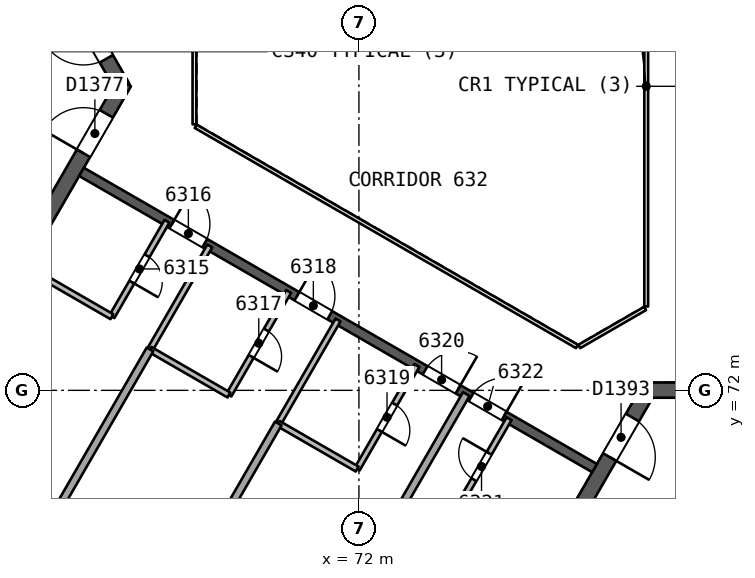
"""IFC4 building model, lengths in metres.
Left out: names, types, materials, properties, quantities, classifications, styles, units other than length and angle.
Written with IfcOpenShell. Run it as: python <this file> out.ifc"""

import sys

from ifc_helpers import new_model, si_unit, direction, frame, frame_2d, origin, place, context, subcontext, project, spatial, rectangle, extrude, element, fill, save


model = new_model("IFC4")
c1 = context("Model", 3, precision=1e-05, world=origin(), true_north=direction((0.0, 1.0)))
c2 = subcontext(c1, "Body", "Model", "MODEL_VIEW")
j1 = project(units=[si_unit("LENGTHUNIT", "METRE"), si_unit("PLANEANGLEUNIT", "RADIAN")], contexts=[c1])
p1 = place(None, origin())
s1 = spatial("IfcSite", under=j1, at=p1, CompositionType="ELEMENT")
p2 = place(p1, origin())
s2 = spatial("IfcBuilding", under=s1, at=p2, CompositionType="ELEMENT")
p3 = place(p2, frame((0.0, 0.0, 259.0)))
s3 = spatial("IfcBuildingStorey", under=s2, at=p3, CompositionType="ELEMENT", Elevation=259.0)
p4 = place(p3, frame((65.769, 80.0, 0.0), z_axis=(0.0, 0.0, 1.0), x_axis=(-0.50000177223, 0.866024380585, 0.0)))
e1 = element("IfcWall", 1, at=p4, inside=s3, PredefinedType="SHEAR", context=c2, shape_type="SweptSolid", body=[
    extrude(rectangle(XDim=10.265, YDim=0.4, at=frame_2d((5.132, 0.0))), origin(), (0.0, 0.0, 1.0), 3.7),
])
p5 = place(p4, frame((0.834, 0.0, 0.0)))
e2 = element("IfcOpeningElement", 2, at=p5, cuts=e1, PredefinedType="OPENING", context=c2, shape_type="SweptSolid", body=[
    extrude(rectangle(XDim=1.2, YDim=2.1, at=frame_2d((0.6, 1.05))), frame((0.0, 0.21, 0.0), z_axis=(0.0, -1.0, 0.0), x_axis=(1.0, 0.0, 0.0)), (0.0, 0.0, 1.0), 0.421),
])
p6 = place(p3, frame((60.737, 71.284, 0.0), z_axis=(0.0, 0.0, 1.0), x_axis=(0.50000547566, 0.866022242388, 0.0)))
e3 = element("IfcWall", 3, at=p6, inside=s3, PredefinedType="SHEAR", context=c2, shape_type="SweptSolid", body=[
    extrude(rectangle(XDim=10.18, YDim=0.4, at=frame_2d((5.09, 0.0))), origin(), (0.0, 0.0, 1.0), 3.7),
])
p7 = place(p6, frame((8.03, 0.0, 0.0)))
e4 = element("IfcOpeningElement", 4, at=p7, cuts=e3, PredefinedType="OPENING", context=c2, shape_type="SweptSolid", body=[
    extrude(rectangle(XDim=1.2, YDim=2.1, at=frame_2d((0.6, 1.05))), frame((0.0, 0.21, 0.0), z_axis=(0.0, -1.0, 0.0), x_axis=(1.0, 0.0, 0.0)), (0.0, 0.0, 1.0), 0.421),
])
p8 = place(p3, frame((79.615, 72.006, 0.0), z_axis=(0.0, 0.0, 1.0), x_axis=(-0.50000177223, -0.866024380585, 0.0)))
e5 = element("IfcWall", 5, at=p8, inside=s3, PredefinedType="SHEAR", context=c2, shape_type="SweptSolid", body=[
    extrude(rectangle(XDim=10.265, YDim=0.4, at=frame_2d((5.132, 0.0))), origin(), (0.0, 0.0, 1.0), 3.7),
])
p9 = place(p8, frame((0.834, 0.0, 0.0)))
e6 = element("IfcOpeningElement", 6, at=p9, cuts=e5, PredefinedType="OPENING", context=c2, shape_type="SweptSolid", body=[
    extrude(rectangle(XDim=1.2, YDim=2.1, at=frame_2d((0.6, 1.05))), frame((0.0, 0.21, 0.0), z_axis=(0.0, -1.0, 0.0), x_axis=(1.0, 0.0, 0.0)), (0.0, 0.0, 1.0), 0.421),
])
p10 = place(p3, frame((89.68, 72.006, 0.0), z_axis=(0.0, 0.0, 1.0), x_axis=(-1.0, 0.0, 0.0)))
e7 = element("IfcWall", 7, at=p10, inside=s3, PredefinedType="SHEAR", context=c2, shape_type="SweptSolid", body=[
    extrude(rectangle(XDim=10.18, YDim=0.4, at=frame_2d((5.09, 0.0))), origin(), (0.0, 0.0, 1.0), 3.7),
])
p11 = place(p10, frame((8.03, 0.0, 0.0)))
e8 = element("IfcOpeningElement", 8, at=p11, cuts=e7, PredefinedType="OPENING", context=c2, shape_type="SweptSolid", body=[
    extrude(rectangle(XDim=1.2, YDim=2.1, at=frame_2d((0.6, 1.05))), frame((0.0, 0.21, 0.0), z_axis=(0.0, -1.0, 0.0), x_axis=(1.0, 0.0, 0.0)), (0.0, 0.0, 1.0), 0.421),
])
p12 = place(p3, frame((64.7, 77.748, 0.0), z_axis=(0.0, 0.0, 1.0), x_axis=(0.866026492143, -0.499998114903, 0.0)))
e9 = element("IfcWall", 9, at=p12, inside=s3, PredefinedType="SHEAR", context=c2, shape_type="SweptSolid", body=[
    extrude(rectangle(XDim=15.588, YDim=0.25, at=frame_2d((7.794, 0.0))), origin(), (0.0, 0.0, 1.0), 3.3),
])
p13 = place(p12, frame((2.747, 0.0, 0.0)))
e10 = element("IfcOpeningElement", 10, at=p13, cuts=e9, PredefinedType="OPENING", context=c2, shape_type="SweptSolid", body=[
    extrude(rectangle(XDim=1.0, YDim=2.1, at=frame_2d((0.5, 1.05))), frame((0.0, 0.135, 0.0), z_axis=(0.0, -1.0, 0.0), x_axis=(1.0, 0.0, 0.0)), (0.0, 0.0, 1.0), 0.271),
])
p14 = place(p12, frame((6.544, 0.0, 0.0)))
e11 = element("IfcOpeningElement", 11, at=p14, cuts=e9, PredefinedType="OPENING", context=c2, shape_type="SweptSolid", body=[
    extrude(rectangle(XDim=1.0, YDim=2.1, at=frame_2d((0.5, 1.05))), frame((0.0, 0.135, 0.0), z_axis=(0.0, -1.0, 0.0), x_axis=(1.0, 0.0, 0.0)), (0.0, 0.0, 1.0), 0.271),
])
p15 = place(p12, frame((10.441, 0.0, 0.0)))
e12 = element("IfcOpeningElement", 12, at=p15, cuts=e9, PredefinedType="OPENING", context=c2, shape_type="SweptSolid", body=[
    extrude(rectangle(XDim=1.0, YDim=2.1, at=frame_2d((0.5, 1.05))), frame((0.0, 0.135, 0.0), z_axis=(0.0, -1.0, 0.0), x_axis=(1.0, 0.0, 0.0)), (0.0, 0.0, 1.0), 0.271),
])
p16 = place(p12, frame((11.841, 0.0, 0.0)))
e13 = element("IfcOpeningElement", 13, at=p16, cuts=e9, PredefinedType="OPENING", context=c2, shape_type="SweptSolid", body=[
    extrude(rectangle(XDim=1.0, YDim=2.1, at=frame_2d((0.5, 1.05))), frame((0.0, 0.135, 0.0), z_axis=(0.0, -1.0, 0.0), x_axis=(1.0, 0.0, 0.0)), (0.0, 0.0, 1.0), 0.271),
])
p17 = place(p3, frame((66.949, 76.45, 0.0), z_axis=(0.0, 0.0, 1.0), x_axis=(-0.499987231761, -0.866032775405, 0.0)))
e14 = element("IfcWall", 14, at=p17, inside=s3, PredefinedType="PARTITIONING", context=c2, shape_type="SweptSolid", body=[
    extrude(rectangle(XDim=2.9, YDim=0.15, at=frame_2d((1.45, 0.0))), origin(), (0.0, 0.0, 1.0), 3.3),
])
p18 = place(p17, frame((1.05, 0.0, 0.0)))
e15 = element("IfcOpeningElement", 15, at=p18, cuts=e14, PredefinedType="OPENING", context=c2, shape_type="SweptSolid", body=[
    extrude(rectangle(XDim=0.8, YDim=2.1, at=frame_2d((0.4, 1.05))), frame((0.0, 0.085, 0.0), z_axis=(0.0, -1.0, 0.0), x_axis=(1.0, 0.0, 0.0)), (0.0, 0.0, 1.0), 0.171),
])
p19 = place(p3, frame((65.499, 73.938, 0.0), z_axis=(0.0, 0.0, 1.0), x_axis=(-0.866004188936, 0.500036743394, 0.0)))
e16 = element("IfcWall", 16, at=p19, inside=s3, PredefinedType="PARTITIONING", context=c2, shape_type="SweptSolid", body=[
    extrude(rectangle(XDim=2.398, YDim=0.15, at=frame_2d((1.199, 0.0))), origin(), (0.0, 0.0, 1.0), 3.3),
])
p20 = place(p3, frame((63.261, 67.462, 0.0), z_axis=(0.0, 0.0, 1.0), x_axis=(0.499983274767, 0.866035059887, 0.0)))
e17 = element("IfcWall", 17, at=p20, inside=s3, PredefinedType="PARTITIONING", context=c2, shape_type="SweptSolid", body=[
    extrude(rectangle(XDim=6.482, YDim=0.2, at=frame_2d((3.241, 0.0))), origin(), (0.0, 0.0, 1.0), 3.3),
])
p21 = place(p3, frame((66.502, 73.076, 0.0), z_axis=(0.0, 0.0, 1.0), x_axis=(0.499995674689, 0.86602790099, 0.0)))
e18 = element("IfcWall", 18, at=p21, inside=s3, PredefinedType="PARTITIONING", context=c2, shape_type="SweptSolid", body=[
    extrude(rectangle(XDim=3.146, YDim=0.15, at=frame_2d((1.573, 0.0))), origin(), (0.0, 0.0, 1.0), 3.3),
])
p22 = place(p3, frame((70.151, 74.601, 0.0), z_axis=(0.0, 0.0, 1.0), x_axis=(-0.499995674689, -0.86602790099, 0.0)))
e19 = element("IfcWall", 19, at=p22, inside=s3, PredefinedType="PARTITIONING", context=c2, shape_type="SweptSolid", body=[
    extrude(rectangle(XDim=3.146, YDim=0.15, at=frame_2d((1.573, 0.0))), origin(), (0.0, 0.0, 1.0), 3.3),
])
p23 = place(p22, frame((1.173, 0.0, 0.0)))
e20 = element("IfcOpeningElement", 20, at=p23, cuts=e19, PredefinedType="OPENING", context=c2, shape_type="SweptSolid", body=[
    extrude(rectangle(XDim=0.8, YDim=2.1, at=frame_2d((0.4, 1.05))), frame((0.0, 0.085, 0.0), z_axis=(0.0, -1.0, 0.0), x_axis=(1.0, 0.0, 0.0)), (0.0, 0.0, 1.0), 0.171),
])
p24 = place(p3, frame((68.578, 71.877, 0.0), z_axis=(0.0, 0.0, 1.0), x_axis=(-0.866034636017, 0.499984008963, 0.0)))
e21 = element("IfcWall", 21, at=p24, inside=s3, PredefinedType="PARTITIONING", context=c2, shape_type="SweptSolid", body=[
    extrude(rectangle(XDim=2.397, YDim=0.15, at=frame_2d((1.198, 0.0))), origin(), (0.0, 0.0, 1.0), 3.3),
])
p25 = place(p3, frame((66.636, 65.513, 0.0), z_axis=(0.0, 0.0, 1.0), x_axis=(0.499983274767, 0.866035059887, 0.0)))
e22 = element("IfcWall", 22, at=p25, inside=s3, PredefinedType="PARTITIONING", context=c2, shape_type="SweptSolid", body=[
    extrude(rectangle(XDim=6.482, YDim=0.2, at=frame_2d((3.241, 0.0))), origin(), (0.0, 0.0, 1.0), 3.3),
])
p26 = place(p3, frame((69.877, 71.127, 0.0), z_axis=(0.0, 0.0, 1.0), x_axis=(0.499995674689, 0.86602790099, 0.0)))
e23 = element("IfcWall", 23, at=p26, inside=s3, PredefinedType="PARTITIONING", context=c2, shape_type="SweptSolid", body=[
    extrude(rectangle(XDim=3.146, YDim=0.15, at=frame_2d((1.573, 0.0))), origin(), (0.0, 0.0, 1.0), 3.3),
])
p27 = place(p3, frame((73.526, 72.653, 0.0), z_axis=(0.0, 0.0, 1.0), x_axis=(-0.500029284648, -0.866008495625, 0.0)))
e24 = element("IfcWall", 24, at=p27, inside=s3, PredefinedType="PARTITIONING", context=c2, shape_type="SweptSolid", body=[
    extrude(rectangle(XDim=3.145, YDim=0.15, at=frame_2d((1.573, 0.0))), origin(), (0.0, 0.0, 1.0), 3.3),
])
p28 = place(p27, frame((1.173, 0.0, 0.0)))
e25 = element("IfcOpeningElement", 25, at=p28, cuts=e24, PredefinedType="OPENING", context=c2, shape_type="SweptSolid", body=[
    extrude(rectangle(XDim=0.8, YDim=2.1, at=frame_2d((0.4, 1.05))), frame((0.0, 0.085, 0.0), z_axis=(0.0, -1.0, 0.0), x_axis=(1.0, 0.0, 0.0)), (0.0, 0.0, 1.0), 0.171),
])
p29 = place(p3, frame((71.953, 69.929, 0.0), z_axis=(0.0, 0.0, 1.0), x_axis=(-0.866034636017, 0.499984008963, 0.0)))
e26 = element("IfcWall", 26, at=p29, inside=s3, PredefinedType="PARTITIONING", context=c2, shape_type="SweptSolid", body=[
    extrude(rectangle(XDim=2.397, YDim=0.15, at=frame_2d((1.198, 0.0))), origin(), (0.0, 0.0, 1.0), 3.3),
])
p30 = place(p3, frame((70.011, 63.565, 0.0), z_axis=(0.0, 0.0, 1.0), x_axis=(0.499987326052, 0.866032720968, 0.0)))
e27 = element("IfcWall", 27, at=p30, inside=s3, PredefinedType="PARTITIONING", context=c2, shape_type="SweptSolid", body=[
    extrude(rectangle(XDim=9.628, YDim=0.2, at=frame_2d((4.814, 0.0))), origin(), (0.0, 0.0, 1.0), 3.3),
])
p31 = place(p3, frame((74.501, 68.741, 0.0), z_axis=(0.0, 0.0, 1.0), x_axis=(0.50005036918, 0.865996321171, 0.0)))
e28 = element("IfcWall", 28, at=p31, inside=s3, PredefinedType="PARTITIONING", context=c2, shape_type="SweptSolid", body=[
    extrude(rectangle(XDim=2.9, YDim=0.15, at=frame_2d((1.45, 0.0))), origin(), (0.0, 0.0, 1.0), 3.3),
])
p32 = place(p31, frame((1.05, 0.0, 0.0)))
e29 = element("IfcOpeningElement", 29, at=p32, cuts=e28, PredefinedType="OPENING", context=c2, shape_type="SweptSolid", body=[
    extrude(rectangle(XDim=0.8, YDim=2.1, at=frame_2d((0.4, 1.05))), frame((0.0, 0.085, 0.0), z_axis=(0.0, -1.0, 0.0), x_axis=(1.0, 0.0, 0.0)), (0.0, 0.0, 1.0), 0.171),
])
p33 = place(p3, frame((87.577, 53.251, 0.0), z_axis=(0.0, 0.0, 1.0), x_axis=(-0.86602550179, 0.499999830249, 0.0)))
e30 = element("IfcWall", 30, at=p33, inside=s3, PredefinedType="SOLIDWALL", context=c2, shape_type="SweptSolid", body=[
    extrude(rectangle(XDim=48.533, YDim=0.3, at=frame_2d((24.267, 0.0))), origin(), (0.0, 0.0, 1.0), 3.3),
])
p34 = place(p33, frame((37.192, 0.0, 0.0)))
e31 = element("IfcOpeningElement", 31, at=p34, cuts=e30, PredefinedType="OPENING", context=c2, shape_type="SweptSolid", body=[
    extrude(rectangle(XDim=2.4, YDim=2.4, at=frame_2d((1.2, 1.2))), frame((0.0, 0.161, 0.0), z_axis=(0.0, -1.0, 0.0), x_axis=(1.0, 0.0, 0.0)), (0.0, 0.0, 1.0), 0.321),
])
p35 = place(p33, frame((8.941, 0.0, 0.0)))
e32 = element("IfcOpeningElement", 32, at=p35, cuts=e30, PredefinedType="OPENING", context=c2, shape_type="SweptSolid", body=[
    extrude(rectangle(XDim=2.4, YDim=2.4, at=frame_2d((1.2, 1.2))), frame((0.0, 0.161, 0.0), z_axis=(0.0, -1.0, 0.0), x_axis=(1.0, 0.0, 0.0)), (0.0, 0.0, 1.0), 0.321),
])
p36 = place(p33, frame((25.015, 0.0, 0.0)))
e33 = element("IfcOpeningElement", 33, at=p36, cuts=e30, PredefinedType="OPENING", context=c2, shape_type="SweptSolid", body=[
    extrude(rectangle(XDim=2.4, YDim=2.4, at=frame_2d((1.2, 1.2))), frame((0.0, 0.161, 0.0), z_axis=(0.0, -1.0, 0.0), x_axis=(1.0, 0.0, 0.0)), (0.0, 0.0, 1.0), 0.321),
])
p37 = place(p33, frame((21.118, 0.0, 0.0)))
e34 = element("IfcOpeningElement", 34, at=p37, cuts=e30, PredefinedType="OPENING", context=c2, shape_type="SweptSolid", body=[
    extrude(rectangle(XDim=2.4, YDim=2.4, at=frame_2d((1.2, 1.2))), frame((0.0, 0.161, 0.0), z_axis=(0.0, -1.0, 0.0), x_axis=(1.0, 0.0, 0.0)), (0.0, 0.0, 1.0), 0.321),
])
p38 = place(p3, frame((77.135, 64.952, 0.0), z_axis=(0.0, 0.0, 1.0), x_axis=(0.866031916153, 0.499988720078, 0.0)))
e35 = element("IfcWall", 35, at=p38, inside=s3, PredefinedType="SOLIDWALL", context=c2, shape_type="SweptSolid", body=[
    extrude(rectangle(XDim=11.35, YDim=0.2, at=frame_2d((5.675, 0.0))), origin(), (0.0, 0.0, 1.0), 3.3),
])
p39 = place(p38, frame((2.875, 0.0, 0.0)))
e36 = element("IfcOpeningElement", 36, at=p39, cuts=e35, PredefinedType="OPENING", context=c2, shape_type="SweptSolid", body=[
    extrude(rectangle(XDim=1.1, YDim=2.1, at=frame_2d((0.55, 1.05))), frame((0.0, 0.11, 0.0), z_axis=(0.0, -1.0, 0.0), x_axis=(1.0, 0.0, 0.0)), (0.0, 0.0, 1.0), 0.221),
])
p40 = place(p38, frame((5.125, 0.0, 0.0)))
e37 = element("IfcOpeningElement", 37, at=p40, cuts=e35, PredefinedType="OPENING", context=c2, shape_type="SweptSolid", body=[
    extrude(rectangle(XDim=1.1, YDim=2.1, at=frame_2d((0.55, 1.05))), frame((0.0, 0.11, 0.0), z_axis=(0.0, -1.0, 0.0), x_axis=(1.0, 0.0, 0.0)), (0.0, 0.0, 1.0), 0.221),
])
p41 = place(p38, frame((7.375, 0.0, 0.0)))
e38 = element("IfcOpeningElement", 38, at=p41, cuts=e35, PredefinedType="OPENING", context=c2, shape_type="SweptSolid", body=[
    extrude(rectangle(XDim=1.1, YDim=2.1, at=frame_2d((0.55, 1.05))), frame((0.0, 0.11, 0.0), z_axis=(0.0, -1.0, 0.0), x_axis=(1.0, 0.0, 0.0)), (0.0, 0.0, 1.0), 0.221),
])
p42 = place(p3, frame((79.56, 74.206, 0.0), z_axis=(0.0, 0.0, 1.0), x_axis=(0.0, 1.0, 0.0)))
e39 = element("IfcWall", 39, at=p42, inside=s3, PredefinedType="PARTITIONING", context=c2, shape_type="SweptSolid", body=[
    extrude(rectangle(XDim=11.588, YDim=0.1, at=frame_2d((5.794, 0.0))), origin(), (0.0, 0.0, 1.0), 3.3),
])
p43 = place(p3, frame((67.672, 81.0, 0.0), z_axis=(0.0, 0.0, 1.0), x_axis=(0.0, -1.0, 0.0)))
e40 = element("IfcWall", 40, at=p43, inside=s3, PredefinedType="PARTITIONING", context=c2, shape_type="SweptSolid", body=[
    extrude(rectangle(XDim=2.0, YDim=0.1, at=frame_2d((1.0, 0.0))), origin(), (0.0, 0.0, 1.0), 3.3),
])
p44 = place(p3, frame((67.702, 78.948, 0.0), z_axis=(0.0, 0.0, 1.0), x_axis=(0.866026658274, -0.499997827154, 0.0)))
e41 = element("IfcWall", 41, at=p44, inside=s3, PredefinedType="PARTITIONING", context=c2, shape_type="SweptSolid", body=[
    extrude(rectangle(XDim=11.588, YDim=0.1, at=frame_2d((5.794, 0.0))), origin(), (0.0, 0.0, 1.0), 3.3),
])
p45 = place(p3, frame((77.798, 73.154, 0.0), z_axis=(0.0, 0.0, 1.0), x_axis=(0.866041268327, 0.499972520799, 0.0)))
e42 = element("IfcWall", 42, at=p45, inside=s3, PredefinedType="PARTITIONING", context=c2, shape_type="SweptSolid", body=[
    extrude(rectangle(XDim=2.0, YDim=0.1, at=frame_2d((1.0, 0.0))), origin(), (0.0, 0.0, 1.0), 3.3),
])
p46 = place(p18, origin())
e43 = element("IfcDoor", 43, at=p46, inside=s3, OperationType="SINGLE_SWING_RIGHT", PredefinedType="NOTDEFINED", context=c2, shape_type="SweptSolid", body=[
    extrude(rectangle(XDim=0.8, YDim=2.1, at=frame_2d((0.4, 1.05))), frame((0.0, 0.025, 0.0), z_axis=(0.0, -1.0, 0.0), x_axis=(1.0, 0.0, 0.0)), (0.0, 0.0, 1.0), 0.05),
])
fill(e15, e43)
p47 = place(p13, origin())
e44 = element("IfcDoor", 44, at=p47, inside=s3, OperationType="SINGLE_SWING_LEFT", PredefinedType="NOTDEFINED", context=c2, shape_type="SweptSolid", body=[
    extrude(rectangle(XDim=1.0, YDim=2.1, at=frame_2d((0.5, 1.05))), frame((0.0, 0.025, 0.0), z_axis=(0.0, -1.0, 0.0), x_axis=(1.0, 0.0, 0.0)), (0.0, 0.0, 1.0), 0.05),
])
fill(e10, e44)
p48 = place(p23, origin())
e45 = element("IfcDoor", 45, at=p48, inside=s3, OperationType="SINGLE_SWING_RIGHT", PredefinedType="NOTDEFINED", context=c2, shape_type="SweptSolid", body=[
    extrude(rectangle(XDim=0.8, YDim=2.1, at=frame_2d((0.4, 1.05))), frame((0.0, 0.025, 0.0), z_axis=(0.0, -1.0, 0.0), x_axis=(1.0, 0.0, 0.0)), (0.0, 0.0, 1.0), 0.05),
])
fill(e20, e45)
p49 = place(p14, origin())
e46 = element("IfcDoor", 46, at=p49, inside=s3, OperationType="SINGLE_SWING_LEFT", PredefinedType="NOTDEFINED", context=c2, shape_type="SweptSolid", body=[
    extrude(rectangle(XDim=1.0, YDim=2.1, at=frame_2d((0.5, 1.05))), frame((0.0, 0.025, 0.0), z_axis=(0.0, -1.0, 0.0), x_axis=(1.0, 0.0, 0.0)), (0.0, 0.0, 1.0), 0.05),
])
fill(e11, e46)
p50 = place(p28, origin())
e47 = element("IfcDoor", 47, at=p50, inside=s3, OperationType="SINGLE_SWING_RIGHT", PredefinedType="NOTDEFINED", context=c2, shape_type="SweptSolid", body=[
    extrude(rectangle(XDim=0.8, YDim=2.1, at=frame_2d((0.4, 1.05))), frame((0.0, 0.025, 0.0), z_axis=(0.0, -1.0, 0.0), x_axis=(1.0, 0.0, 0.0)), (0.0, 0.0, 1.0), 0.05),
])
fill(e25, e47)
p51 = place(p15, origin())
e48 = element("IfcDoor", 48, at=p51, inside=s3, OperationType="SINGLE_SWING_RIGHT", PredefinedType="NOTDEFINED", context=c2, shape_type="SweptSolid", body=[
    extrude(rectangle(XDim=1.0, YDim=2.1, at=frame_2d((0.5, 1.05))), frame((0.0, 0.025, 0.0), z_axis=(0.0, -1.0, 0.0), x_axis=(1.0, 0.0, 0.0)), (0.0, 0.0, 1.0), 0.05),
])
fill(e12, e48)
p52 = place(p32, origin())
e49 = element("IfcDoor", 49, at=p52, inside=s3, OperationType="SINGLE_SWING_RIGHT", PredefinedType="NOTDEFINED", context=c2, shape_type="SweptSolid", body=[
    extrude(rectangle(XDim=0.8, YDim=2.1, at=frame_2d((0.4, 1.05))), frame((0.0, 0.025, 0.0), z_axis=(0.0, -1.0, 0.0), x_axis=(1.0, 0.0, 0.0)), (0.0, 0.0, 1.0), 0.05),
])
fill(e29, e49)
p53 = place(p16, origin())
e50 = element("IfcDoor", 50, at=p53, inside=s3, OperationType="SINGLE_SWING_RIGHT", PredefinedType="NOTDEFINED", context=c2, shape_type="SweptSolid", body=[
    extrude(rectangle(XDim=1.0, YDim=2.1, at=frame_2d((0.5, 1.05))), frame((0.0, 0.025, 0.0), z_axis=(0.0, -1.0, 0.0), x_axis=(1.0, 0.0, 0.0)), (0.0, 0.0, 1.0), 0.05),
])
fill(e13, e50)
p54 = place(p5, origin())
e51 = element("IfcDoor", 51, at=p54, inside=s3, OperationType="SINGLE_SWING_RIGHT", PredefinedType="NOTDEFINED", context=c2, shape_type="SweptSolid", body=[
    extrude(rectangle(XDim=1.2, YDim=2.1, at=frame_2d((0.6, 1.05))), frame((0.0, 0.025, 0.0), z_axis=(0.0, -1.0, 0.0), x_axis=(1.0, 0.0, 0.0)), (0.0, 0.0, 1.0), 0.05),
])
fill(e2, e51)
p55 = place(p7, origin())
e52 = element("IfcDoor", 52, at=p55, inside=s3, OperationType="SINGLE_SWING_LEFT", PredefinedType="NOTDEFINED", context=c2, shape_type="SweptSolid", body=[
    extrude(rectangle(XDim=1.2, YDim=2.1, at=frame_2d((0.6, 1.05))), frame((0.0, 0.025, 0.0), z_axis=(0.0, -1.0, 0.0), x_axis=(1.0, 0.0, 0.0)), (0.0, 0.0, 1.0), 0.05),
])
fill(e4, e52)
p56 = place(p9, origin())
e53 = element("IfcDoor", 53, at=p56, inside=s3, OperationType="SINGLE_SWING_RIGHT", PredefinedType="NOTDEFINED", context=c2, shape_type="SweptSolid", body=[
    extrude(rectangle(XDim=1.2, YDim=2.1, at=frame_2d((0.6, 1.05))), frame((0.0, 0.025, 0.0), z_axis=(0.0, -1.0, 0.0), x_axis=(1.0, 0.0, 0.0)), (0.0, 0.0, 1.0), 0.05),
])
fill(e6, e53)
save(model, sys.argv[1])
